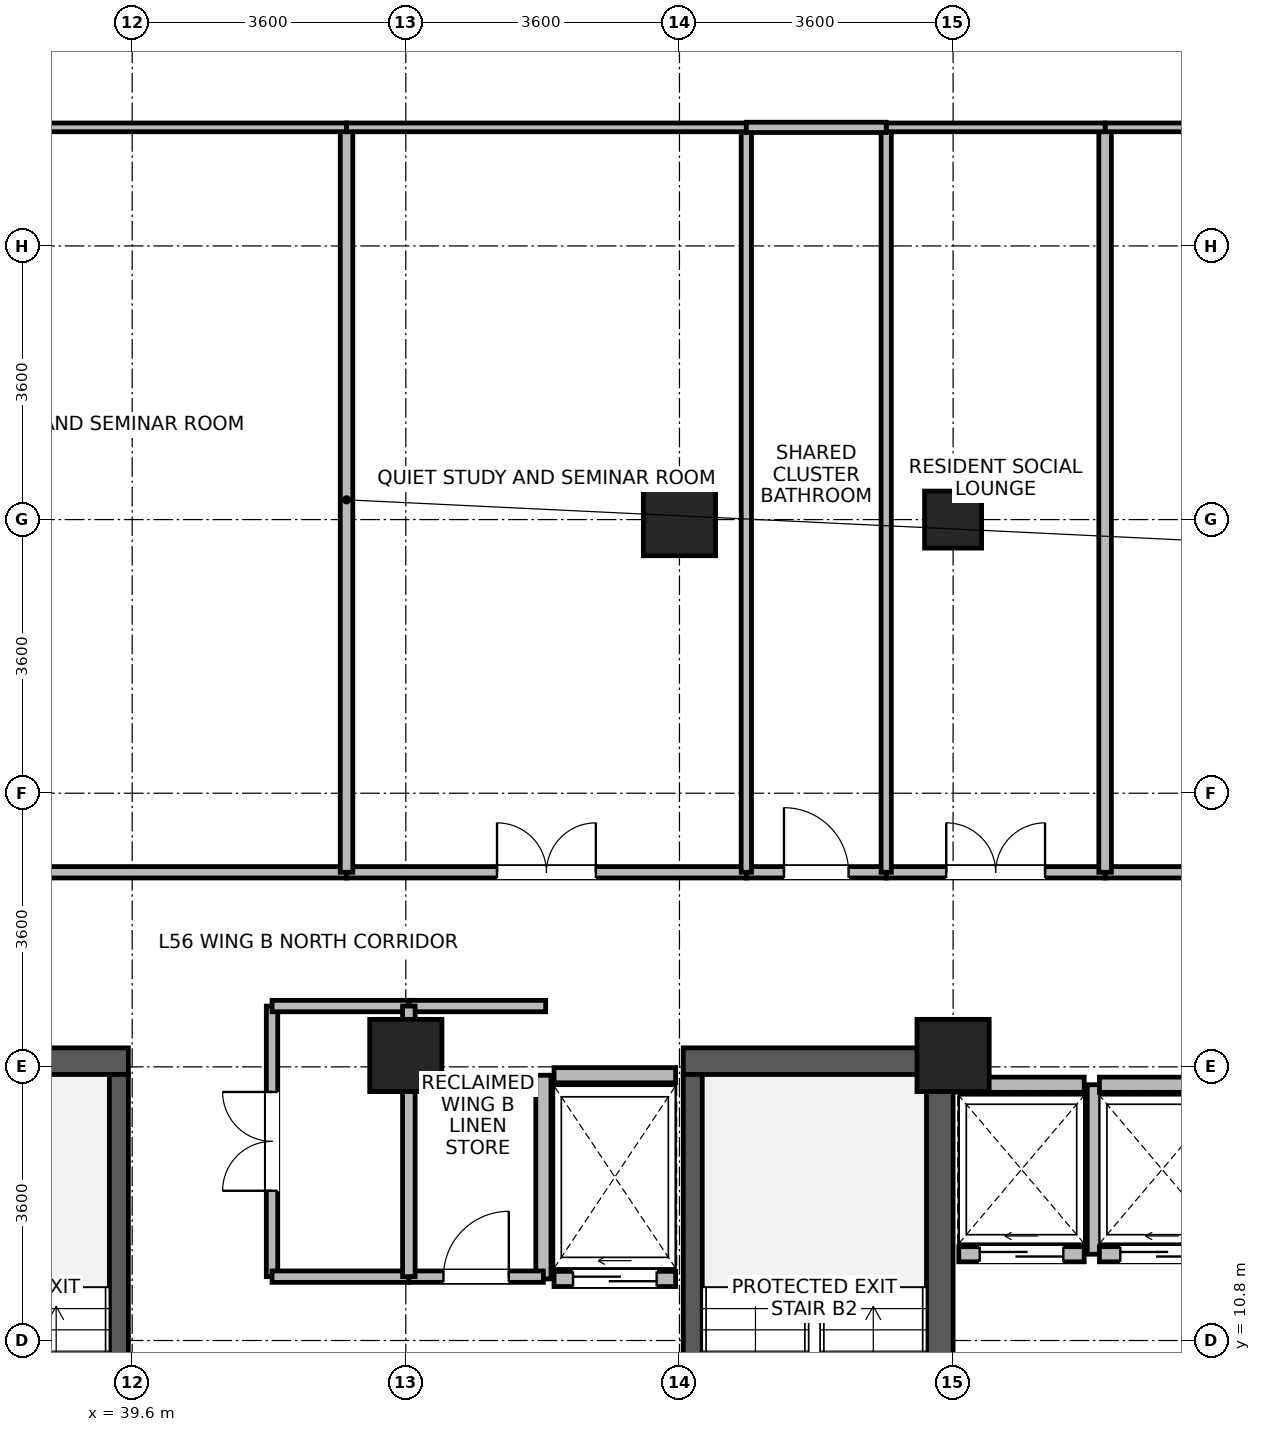
"""IFC4 building model, lengths in metres.
Left out: names, types, materials, properties, quantities, classifications, styles, units other than length and angle.
Written with IfcOpenShell. Run it as: python <this file> out.ifc"""

import sys

from ifc_helpers import new_model, si_unit, direction, frame, frame_2d, origin, origin_2d, place, context, subcontext, project, spatial, rectangle, extrude, source, transform, mapped, element, fill, save


model = new_model("IFC4")
c1 = context("Model", 3, precision=1e-05, world=origin(), true_north=direction((0.0, 1.0)))
c2 = subcontext(c1, "Body", "Model", "MODEL_VIEW")
j1 = project(units=[si_unit("LENGTHUNIT", "METRE"), si_unit("PLANEANGLEUNIT", "RADIAN")], contexts=[c1])
p1 = place(None, origin())
s1 = spatial("IfcSite", under=j1, at=p1, CompositionType="ELEMENT")
p2 = place(p1, origin())
s2 = spatial("IfcBuilding", under=s1, at=p2, CompositionType="ELEMENT")
p3 = place(p2, frame((0.0, 0.0, 220.3)))
s3 = spatial("IfcBuildingStorey", under=s2, at=p3, CompositionType="ELEMENT", Elevation=220.3)
p4 = place(p3, frame((50.225, 6.95, 0.0), z_axis=(0.0, 0.0, 1.0), x_axis=(0.0, 1.0, 0.0)))
e1 = element("IfcWall", 1, at=p4, inside=s3, PredefinedType="SHEAR", context=c2, shape_type="SweptSolid", body=[
    extrude(rectangle(XDim=7.7, YDim=0.35, at=frame_2d((3.85, 0.0))), origin(), (0.0, 0.0, 1.0), 3.47),
])
for number, where, z_axis, x_axis in (
    (2, (36.35, 14.475, 0.0), (0.0, 0.0, 1.0), (1.0, 0.0, 0.0)),
    (3, (46.85, 14.475, 0.0), (0.0, 0.0, 1.0), (1.0, 0.0, 0.0)),
):
    element("IfcWall", number, at=place(p3, frame(where, z_axis=z_axis, x_axis=x_axis)), inside=s3, PredefinedType="SHEAR", context=c2, shape_type="SweptSolid", body=[
        extrude(rectangle(XDim=3.2, YDim=0.35, at=frame_2d((1.6, 0.0))), origin(), (0.0, 0.0, 1.0), 3.47),
    ])
p5 = place(p3, frame((39.425, 7.3, 0.0), z_axis=(0.0, 0.0, 1.0), x_axis=(0.0, 1.0, 0.0)))
e4 = element("IfcWall", 4, at=p5, inside=s3, PredefinedType="SHEAR", context=c2, shape_type="SweptSolid", body=[
    extrude(rectangle(XDim=7.0, YDim=0.25, at=frame_2d((3.5, 0.0))), origin(), (0.0, 0.0, 1.0), 3.47),
])
p6 = place(p5, frame((0.15, 0.0, 0.0)))
e5 = element("IfcOpeningElement", 5, at=p6, cuts=e4, PredefinedType="OPENING", context=c2, shape_type="SweptSolid", body=[
    extrude(rectangle(XDim=1.1, YDim=2.08, at=frame_2d((0.55, 1.04))), frame((0.0, 0.135, 0.0), z_axis=(0.0, -1.0, 0.0), x_axis=(1.0, 0.0, 0.0)), (0.0, 0.0, 1.0), 0.27),
])
p7 = place(p3, frame((46.975, 7.3, 0.0), z_axis=(0.0, 0.0, 1.0), x_axis=(0.0, 1.0, 0.0)))
e6 = element("IfcWall", 6, at=p7, inside=s3, PredefinedType="SHEAR", context=c2, shape_type="SweptSolid", body=[
    extrude(rectangle(XDim=7.0, YDim=0.25, at=frame_2d((3.5, 0.0))), origin(), (0.0, 0.0, 1.0), 3.47),
])
p8 = place(p7, frame((0.15, 0.0, 0.0)))
e7 = element("IfcOpeningElement", 7, at=p8, cuts=e6, PredefinedType="OPENING", context=c2, shape_type="SweptSolid", body=[
    extrude(rectangle(XDim=1.1, YDim=2.08, at=frame_2d((0.55, 1.04))), frame((0.0, 0.135, 0.0), z_axis=(0.0, -1.0, 0.0), x_axis=(1.0, 0.0, 0.0)), (0.0, 0.0, 1.0), 0.27),
])
m1 = source(origin(), c2, "Body", "SweptSolid", [
    extrude(rectangle(XDim=0.95, YDim=0.95, at=origin_2d()), origin(), (0.0, 0.0, 1.0), 3.7),
])
for number, where, z_axis, x_axis in (
    (8, (46.8, 21.6, 0.0), (0.0, 0.0, 1.0), (1.0, 0.0, 0.0)),
    (9, (43.2, 14.55, 0.0), (0.0, 0.0, 1.0), (1.0, 0.0, 0.0)),
    (10, (50.4, 14.55, 0.0), (0.0, 0.0, 1.0), (1.0, 0.0, 0.0)),
):
    element("IfcColumn", number, at=place(p3, frame(where, z_axis=z_axis, x_axis=x_axis)), inside=s3, PredefinedType="COLUMN", context=c2, shape_type="MappedRepresentation", body=[
        mapped(m1, transform((0.0, 0.0, 0.0), x_axis=(1.0, 0.0, 0.0), y_axis=(0.0, 1.0, 0.0), z_axis=(0.0, 0.0, 1.0), scale=1.0)),
    ])
m2 = source(origin(), c2, "Body", "SweptSolid", [
    extrude(rectangle(XDim=0.75, YDim=0.75, at=origin_2d()), origin(), (0.0, 0.0, 1.0), 3.7),
])
p9 = place(p3, frame((50.4, 21.6, 0.0), z_axis=(0.0, 0.0, 1.0), x_axis=(1.0, 0.0, 0.0)))
e11 = element("IfcColumn", 11, at=p9, inside=s3, PredefinedType="PILASTER", context=c2, shape_type="MappedRepresentation", body=[
    mapped(m2, transform((0.0, 0.0, 0.0), x_axis=(1.0, 0.0, 0.0), y_axis=(0.0, 1.0, 0.0), z_axis=(0.0, 0.0, 1.0), scale=1.0)),
])
p10 = place(p3, frame((50.475, 11.935, 0.0), z_axis=(0.0, 0.0, 1.0), x_axis=(1.0, 0.0, 0.0)))
e12 = element("IfcWall", 12, at=p10, inside=s3, PredefinedType="PARTITIONING", context=c2, shape_type="SweptSolid", body=[
    extrude(rectangle(XDim=1.65, YDim=0.2, at=frame_2d((0.825, 0.0))), origin(), (0.0, 0.0, 1.0), 3.45),
])
p11 = place(p10, frame((0.275, 0.0, 0.0)))
e13 = element("IfcOpeningElement", 13, at=p11, cuts=e12, PredefinedType="OPENING", context=c2, shape_type="SweptSolid", body=[
    extrude(rectangle(XDim=1.1, YDim=2.12, at=frame_2d((0.55, 1.06))), frame((0.0, 0.11, 0.0), z_axis=(0.0, -1.0, 0.0), x_axis=(1.0, 0.0, 0.0)), (0.0, 0.0, 1.0), 0.22),
])
p12 = place(p3, frame((50.475, 14.165, 0.0), z_axis=(0.0, 0.0, 1.0), x_axis=(1.0, 0.0, 0.0)))
e14 = element("IfcWall", 14, at=p12, inside=s3, PredefinedType="PARTITIONING", context=c2, shape_type="SweptSolid", body=[
    extrude(rectangle(XDim=1.65, YDim=0.2, at=frame_2d((0.825, 0.0))), origin(), (0.0, 0.0, 1.0), 3.45),
])
p13 = place(p3, frame((52.265, 11.935, 0.0), z_axis=(0.0, 0.0, 1.0), x_axis=(0.0, 1.0, 0.0)))
e15 = element("IfcWall", 15, at=p13, inside=s3, PredefinedType="PARTITIONING", context=c2, shape_type="SweptSolid", body=[
    extrude(rectangle(XDim=2.23, YDim=0.2, at=frame_2d((1.115, 0.0))), origin(), (0.0, 0.0, 1.0), 3.45),
])
p14 = place(p3, frame((52.325, 11.935, 0.0), z_axis=(0.0, 0.0, 1.0), x_axis=(1.0, 0.0, 0.0)))
e16 = element("IfcWall", 16, at=p14, inside=s3, PredefinedType="PARTITIONING", context=c2, shape_type="SweptSolid", body=[
    extrude(rectangle(XDim=1.65, YDim=0.2, at=frame_2d((0.825, 0.0))), origin(), (0.0, 0.0, 1.0), 3.45),
])
p15 = place(p14, frame((0.275, 0.0, 0.0)))
e17 = element("IfcOpeningElement", 17, at=p15, cuts=e16, PredefinedType="OPENING", context=c2, shape_type="SweptSolid", body=[
    extrude(rectangle(XDim=1.1, YDim=2.12, at=frame_2d((0.55, 1.06))), frame((0.0, 0.11, 0.0), z_axis=(0.0, -1.0, 0.0), x_axis=(1.0, 0.0, 0.0)), (0.0, 0.0, 1.0), 0.22),
])
p16 = place(p3, frame((52.325, 14.165, 0.0), z_axis=(0.0, 0.0, 1.0), x_axis=(1.0, 0.0, 0.0)))
e18 = element("IfcWall", 18, at=p16, inside=s3, PredefinedType="PARTITIONING", context=c2, shape_type="SweptSolid", body=[
    extrude(rectangle(XDim=1.65, YDim=0.2, at=frame_2d((0.825, 0.0))), origin(), (0.0, 0.0, 1.0), 3.45),
])
p17 = place(p3, frame((45.15, 11.61, 0.0), z_axis=(0.0, 0.0, 1.0), x_axis=(1.0, 0.0, 0.0)))
e19 = element("IfcWall", 19, at=p17, inside=s3, PredefinedType="PARTITIONING", context=c2, shape_type="SweptSolid", body=[
    extrude(rectangle(XDim=1.6, YDim=0.2, at=frame_2d((0.8, 0.0))), origin(), (0.0, 0.0, 1.0), 3.45),
])
p18 = place(p17, frame((0.25, 0.0, 0.0)))
e20 = element("IfcOpeningElement", 20, at=p18, cuts=e19, PredefinedType="OPENING", context=c2, shape_type="SweptSolid", body=[
    extrude(rectangle(XDim=1.1, YDim=2.12, at=frame_2d((0.55, 1.06))), frame((0.0, 0.11, 0.0), z_axis=(0.0, -1.0, 0.0), x_axis=(1.0, 0.0, 0.0)), (0.0, 0.0, 1.0), 0.22),
])
p19 = place(p3, frame((45.15, 14.29, 0.0), z_axis=(0.0, 0.0, 1.0), x_axis=(1.0, 0.0, 0.0)))
e21 = element("IfcWall", 21, at=p19, inside=s3, PredefinedType="PARTITIONING", context=c2, shape_type="SweptSolid", body=[
    extrude(rectangle(XDim=1.6, YDim=0.2, at=frame_2d((0.8, 0.0))), origin(), (0.0, 0.0, 1.0), 2.55),
])
p20 = place(p3, frame((45.01, 11.61, 0.0), z_axis=(0.0, 0.0, 1.0), x_axis=(0.0, 1.0, 0.0)))
e22 = element("IfcWall", 22, at=p20, inside=s3, PredefinedType="PARTITIONING", context=c2, shape_type="SweptSolid", body=[
    extrude(rectangle(XDim=2.68, YDim=0.2, at=frame_2d((1.34, 0.0))), origin(), (0.0, 0.0, 1.0), 3.45),
])
p21 = place(p3, frame((52.4, 16.96, 0.0), z_axis=(0.0, 0.0, 1.0), x_axis=(1.0, 0.0, 0.0)))
e23 = element("IfcWall", 23, at=p21, inside=s3, PredefinedType="PARTITIONING", context=c2, shape_type="SweptSolid", body=[
    extrude(rectangle(XDim=8.168, YDim=0.15, at=frame_2d((4.084, 0.0))), origin(), (0.0, 0.0, 1.0), 3.45),
])
p22 = place(p21, frame((3.434, 0.0, 0.0)))
e24 = element("IfcOpeningElement", 24, at=p22, cuts=e23, PredefinedType="OPENING", context=c2, shape_type="SweptSolid", body=[
    extrude(rectangle(XDim=1.3, YDim=2.12, at=frame_2d((0.65, 1.06))), frame((0.0, 0.085, 0.0), z_axis=(0.0, -1.0, 0.0), x_axis=(1.0, 0.0, 0.0)), (0.0, 0.0, 1.0), 0.17),
])
p23 = place(p3, frame((35.36, 16.96, 0.0), z_axis=(0.0, 0.0, 1.0), x_axis=(1.0, 0.0, 0.0)))
e25 = element("IfcWall", 25, at=p23, inside=s3, PredefinedType="PARTITIONING", context=c2, shape_type="SweptSolid", body=[
    extrude(rectangle(XDim=7.06, YDim=0.15, at=frame_2d((3.53, 0.0))), origin(), (0.0, 0.0, 1.0), 3.45),
])
p24 = place(p3, frame((42.42, 16.96, 0.0), z_axis=(0.0, 0.0, 1.0), x_axis=(1.0, 0.0, 0.0)))
e26 = element("IfcWall", 26, at=p24, inside=s3, PredefinedType="PARTITIONING", context=c2, shape_type="SweptSolid", body=[
    extrude(rectangle(XDim=5.26, YDim=0.15, at=frame_2d((2.63, 0.0))), origin(), (0.0, 0.0, 1.0), 3.45),
])
p25 = place(p24, frame((1.98, 0.0, 0.0)))
e27 = element("IfcOpeningElement", 27, at=p25, cuts=e26, PredefinedType="OPENING", context=c2, shape_type="SweptSolid", body=[
    extrude(rectangle(XDim=1.3, YDim=2.12, at=frame_2d((0.65, 1.06))), frame((0.0, 0.085, 0.0), z_axis=(0.0, -1.0, 0.0), x_axis=(1.0, 0.0, 0.0)), (0.0, 0.0, 1.0), 0.17),
])
p26 = place(p3, frame((41.44, 11.64, 0.0), z_axis=(0.0, 0.0, 1.0), x_axis=(0.0, 1.0, 0.0)))
e28 = element("IfcWall", 28, at=p26, inside=s3, PredefinedType="PARTITIONING", context=c2, shape_type="SweptSolid", body=[
    extrude(rectangle(XDim=3.56, YDim=0.15, at=frame_2d((1.78, 0.0))), origin(), (0.0, 0.0, 1.0), 3.45),
])
p27 = place(p26, frame((1.13, 0.0, 0.0)))
e29 = element("IfcOpeningElement", 29, at=p27, cuts=e28, PredefinedType="OPENING", context=c2, shape_type="SweptSolid", body=[
    extrude(rectangle(XDim=1.3, YDim=2.12, at=frame_2d((0.65, 1.06))), frame((0.0, 0.085, 0.0), z_axis=(0.0, -1.0, 0.0), x_axis=(1.0, 0.0, 0.0)), (0.0, 0.0, 1.0), 0.17),
])
p28 = place(p3, frame((49.52, 16.96, 0.0), z_axis=(0.0, 0.0, 1.0), x_axis=(1.0, 0.0, 0.0)))
e30 = element("IfcWall", 30, at=p28, inside=s3, PredefinedType="PARTITIONING", context=c2, shape_type="SweptSolid", body=[
    extrude(rectangle(XDim=2.88, YDim=0.15, at=frame_2d((1.44, 0.0))), origin(), (0.0, 0.0, 1.0), 3.45),
])
p29 = place(p28, frame((0.79, 0.0, 0.0)))
e31 = element("IfcOpeningElement", 31, at=p29, cuts=e30, PredefinedType="OPENING", context=c2, shape_type="SweptSolid", body=[
    extrude(rectangle(XDim=1.3, YDim=2.12, at=frame_2d((0.65, 1.06))), frame((0.0, 0.085, 0.0), z_axis=(0.0, -1.0, 0.0), x_axis=(1.0, 0.0, 0.0)), (0.0, 0.0, 1.0), 0.17),
])
p30 = place(p3, frame((47.68, 16.96, 0.0), z_axis=(0.0, 0.0, 1.0), x_axis=(1.0, 0.0, 0.0)))
e32 = element("IfcWall", 32, at=p30, inside=s3, PredefinedType="PARTITIONING", context=c2, shape_type="SweptSolid", body=[
    extrude(rectangle(XDim=1.84, YDim=0.15, at=frame_2d((0.92, 0.0))), origin(), (0.0, 0.0, 1.0), 3.45),
])
p31 = place(p30, frame((0.495, 0.0, 0.0)))
e33 = element("IfcOpeningElement", 33, at=p31, cuts=e32, PredefinedType="OPENING", context=c2, shape_type="SweptSolid", body=[
    extrude(rectangle(XDim=0.85, YDim=2.04, at=frame_2d((0.425, 1.02))), frame((0.0, 0.085, 0.0), z_axis=(0.0, -1.0, 0.0), x_axis=(1.0, 0.0, 0.0)), (0.0, 0.0, 1.0), 0.17),
])
for number, where, z_axis, x_axis in (
    (34, (41.44, 11.64, 0.0), (0.0, 0.0, 1.0), (1.0, 0.0, 0.0)),
    (35, (41.44, 15.2, 0.0), (0.0, 0.0, 1.0), (1.0, 0.0, 0.0)),
):
    element("IfcWall", number, at=place(p3, frame(where, z_axis=z_axis, x_axis=x_axis)), inside=s3, PredefinedType="PARTITIONING", context=c2, shape_type="SweptSolid", body=[
        extrude(rectangle(XDim=1.8, YDim=0.15, at=frame_2d((0.9, 0.0))), origin(), (0.0, 0.0, 1.0), 3.45),
    ])
p32 = place(p3, frame((43.24, 11.64, 0.0), z_axis=(0.0, 0.0, 1.0), x_axis=(1.0, 0.0, 0.0)))
e36 = element("IfcWall", 36, at=p32, inside=s3, PredefinedType="PARTITIONING", context=c2, shape_type="SweptSolid", body=[
    extrude(rectangle(XDim=1.77, YDim=0.15, at=frame_2d((0.885, 0.0))), origin(), (0.0, 0.0, 1.0), 3.45),
])
p33 = place(p32, frame((0.455, 0.0, 0.0)))
e37 = element("IfcOpeningElement", 37, at=p33, cuts=e36, PredefinedType="OPENING", context=c2, shape_type="SweptSolid", body=[
    extrude(rectangle(XDim=0.86, YDim=2.02, at=frame_2d((0.43, 1.01))), frame((0.0, 0.085, 0.0), z_axis=(0.0, -1.0, 0.0), x_axis=(1.0, 0.0, 0.0)), (0.0, 0.0, 1.0), 0.17),
])
p34 = place(p3, frame((43.24, 15.2, 0.0), z_axis=(0.0, 0.0, 1.0), x_axis=(1.0, 0.0, 0.0)))
e38 = element("IfcWall", 38, at=p34, inside=s3, PredefinedType="PARTITIONING", context=c2, shape_type="SweptSolid", body=[
    extrude(rectangle(XDim=1.8, YDim=0.15, at=frame_2d((0.9, 0.0))), origin(), (0.0, 0.0, 1.0), 3.45),
])
p35 = place(p3, frame((42.42, 16.96, 0.0), z_axis=(0.0, 0.0, 1.0), x_axis=(0.0, 1.0, 0.0)))
e39 = element("IfcWall", 39, at=p35, inside=s3, PredefinedType="PARTITIONING", context=c2, shape_type="SweptSolid", body=[
    extrude(rectangle(XDim=9.8, YDim=0.165, at=frame_2d((4.9, 0.0))), origin(), (0.0, 0.0, 1.0), 3.45),
])
for number, where, z_axis, x_axis in (
    (40, (47.68, 16.96, 0.0), (0.0, 0.0, 1.0), (0.0, 1.0, 0.0)),
    (41, (49.52, 16.96, 0.0), (0.0, 0.0, 1.0), (0.0, 1.0, 0.0)),
):
    element("IfcWall", number, at=place(p3, frame(where, z_axis=z_axis, x_axis=x_axis)), inside=s3, PredefinedType="PARTITIONING", context=c2, shape_type="SweptSolid", body=[
        extrude(rectangle(XDim=9.8, YDim=0.135, at=frame_2d((4.9, 0.0))), origin(), (0.0, 0.0, 1.0), 3.45),
    ])
p36 = place(p3, frame((52.4, 16.96, 0.0), z_axis=(0.0, 0.0, 1.0), x_axis=(0.0, 1.0, 0.0)))
e42 = element("IfcWall", 42, at=p36, inside=s3, PredefinedType="PARTITIONING", context=c2, shape_type="SweptSolid", body=[
    extrude(rectangle(XDim=9.8, YDim=0.165, at=frame_2d((4.9, 0.0))), origin(), (0.0, 0.0, 1.0), 3.45),
])
p37 = place(p3, frame((52.4, 26.76, 0.0), z_axis=(0.0, 0.0, 1.0), x_axis=(1.0, 0.0, 0.0)))
e43 = element("IfcWall", 43, at=p37, inside=s3, PredefinedType="PARTITIONING", context=c2, shape_type="SweptSolid", body=[
    extrude(rectangle(XDim=8.168, YDim=0.115, at=frame_2d((4.084, 0.0))), origin(), (0.0, 0.0, 1.0), 3.45),
])
p38 = place(p3, frame((35.36, 26.76, 0.0), z_axis=(0.0, 0.0, 1.0), x_axis=(1.0, 0.0, 0.0)))
e44 = element("IfcWall", 44, at=p38, inside=s3, PredefinedType="PARTITIONING", context=c2, shape_type="SweptSolid", body=[
    extrude(rectangle(XDim=7.06, YDim=0.115, at=frame_2d((3.53, 0.0))), origin(), (0.0, 0.0, 1.0), 3.45),
])
p39 = place(p3, frame((42.42, 26.76, 0.0), z_axis=(0.0, 0.0, 1.0), x_axis=(1.0, 0.0, 0.0)))
e45 = element("IfcWall", 45, at=p39, inside=s3, PredefinedType="PARTITIONING", context=c2, shape_type="SweptSolid", body=[
    extrude(rectangle(XDim=5.26, YDim=0.115, at=frame_2d((2.63, 0.0))), origin(), (0.0, 0.0, 1.0), 3.45),
])
p40 = place(p3, frame((43.24, 11.64, 0.0), z_axis=(0.0, 0.0, 1.0), x_axis=(0.0, 1.0, 0.0)))
e46 = element("IfcWall", 46, at=p40, inside=s3, PredefinedType="PARTITIONING", context=c2, shape_type="SweptSolid", body=[
    extrude(rectangle(XDim=3.56, YDim=0.165, at=frame_2d((1.78, 0.0))), origin(), (0.0, 0.0, 1.0), 3.45),
])
p41 = place(p3, frame((49.52, 26.76, 0.0), z_axis=(0.0, 0.0, 1.0), x_axis=(1.0, 0.0, 0.0)))
e47 = element("IfcWall", 47, at=p41, inside=s3, PredefinedType="PARTITIONING", context=c2, shape_type="SweptSolid", body=[
    extrude(rectangle(XDim=2.88, YDim=0.115, at=frame_2d((1.44, 0.0))), origin(), (0.0, 0.0, 1.0), 3.45),
])
p42 = place(p3, frame((47.68, 26.76, 0.0), z_axis=(0.0, 0.0, 1.0), x_axis=(1.0, 0.0, 0.0)))
e48 = element("IfcWall", 48, at=p42, inside=s3, PredefinedType="PARTITIONING", context=c2, shape_type="SweptSolid", body=[
    extrude(rectangle(XDim=1.84, YDim=0.135, at=frame_2d((0.92, 0.0))), origin(), (0.0, 0.0, 1.0), 3.45),
])
p43 = place(p11, origin())
e49 = element("IfcDoor", 49, at=p43, inside=s3, OperationType="SLIDING_TO_LEFT", PredefinedType="DOOR", context=c2, shape_type="SweptSolid", body=[
    extrude(rectangle(XDim=1.1, YDim=2.12, at=frame_2d((0.55, 1.06))), frame((0.0, 0.025, 0.0), z_axis=(0.0, -1.0, 0.0), x_axis=(1.0, 0.0, 0.0)), (0.0, 0.0, 1.0), 0.05),
])
fill(e13, e49)
p44 = place(p15, origin())
e50 = element("IfcDoor", 50, at=p44, inside=s3, OperationType="SLIDING_TO_LEFT", PredefinedType="DOOR", context=c2, shape_type="SweptSolid", body=[
    extrude(rectangle(XDim=1.1, YDim=2.12, at=frame_2d((0.55, 1.06))), frame((0.0, 0.025, 0.0), z_axis=(0.0, -1.0, 0.0), x_axis=(1.0, 0.0, 0.0)), (0.0, 0.0, 1.0), 0.05),
])
fill(e17, e50)
p45 = place(p18, origin())
e51 = element("IfcDoor", 51, at=p45, inside=s3, OperationType="SLIDING_TO_LEFT", PredefinedType="DOOR", context=c2, shape_type="SweptSolid", body=[
    extrude(rectangle(XDim=1.1, YDim=2.12, at=frame_2d((0.55, 1.06))), frame((0.0, 0.025, 0.0), z_axis=(0.0, -1.0, 0.0), x_axis=(1.0, 0.0, 0.0)), (0.0, 0.0, 1.0), 0.05),
])
fill(e20, e51)
p46 = place(p25, origin())
e52 = element("IfcDoor", 52, at=p46, inside=s3, OperationType="DOUBLE_DOOR_SINGLE_SWING", PredefinedType="DOOR", context=c2, shape_type="SweptSolid", body=[
    extrude(rectangle(XDim=1.3, YDim=2.12, at=frame_2d((0.65, 1.06))), frame((0.0, 0.025, 0.0), z_axis=(0.0, -1.0, 0.0), x_axis=(1.0, 0.0, 0.0)), (0.0, 0.0, 1.0), 0.05),
])
fill(e27, e52)
p47 = place(p27, origin())
e53 = element("IfcDoor", 53, at=p47, inside=s3, OperationType="DOUBLE_DOOR_SINGLE_SWING", PredefinedType="DOOR", context=c2, shape_type="SweptSolid", body=[
    extrude(rectangle(XDim=1.3, YDim=2.12, at=frame_2d((0.65, 1.06))), frame((0.0, 0.025, 0.0), z_axis=(0.0, -1.0, 0.0), x_axis=(1.0, 0.0, 0.0)), (0.0, 0.0, 1.0), 0.05),
])
fill(e29, e53)
p48 = place(p29, origin())
e54 = element("IfcDoor", 54, at=p48, inside=s3, OperationType="DOUBLE_DOOR_SINGLE_SWING", PredefinedType="DOOR", context=c2, shape_type="SweptSolid", body=[
    extrude(rectangle(XDim=1.3, YDim=2.12, at=frame_2d((0.65, 1.06))), frame((0.0, 0.025, 0.0), z_axis=(0.0, -1.0, 0.0), x_axis=(1.0, 0.0, 0.0)), (0.0, 0.0, 1.0), 0.05),
])
fill(e31, e54)
p49 = place(p31, origin())
e55 = element("IfcDoor", 55, at=p49, inside=s3, OperationType="SINGLE_SWING_LEFT", PredefinedType="DOOR", context=c2, shape_type="SweptSolid", body=[
    extrude(rectangle(XDim=0.85, YDim=2.04, at=frame_2d((0.425, 1.02))), frame((0.0, 0.025, 0.0), z_axis=(0.0, -1.0, 0.0), x_axis=(1.0, 0.0, 0.0)), (0.0, 0.0, 1.0), 0.05),
])
fill(e33, e55)
p50 = place(p33, origin())
e56 = element("IfcDoor", 56, at=p50, inside=s3, OperationType="SINGLE_SWING_RIGHT", PredefinedType="DOOR", context=c2, shape_type="SweptSolid", body=[
    extrude(rectangle(XDim=0.86, YDim=2.02, at=frame_2d((0.43, 1.01))), frame((0.0, 0.025, 0.0), z_axis=(0.0, -1.0, 0.0), x_axis=(1.0, 0.0, 0.0)), (0.0, 0.0, 1.0), 0.05),
])
fill(e37, e56)
save(model, sys.argv[1])
